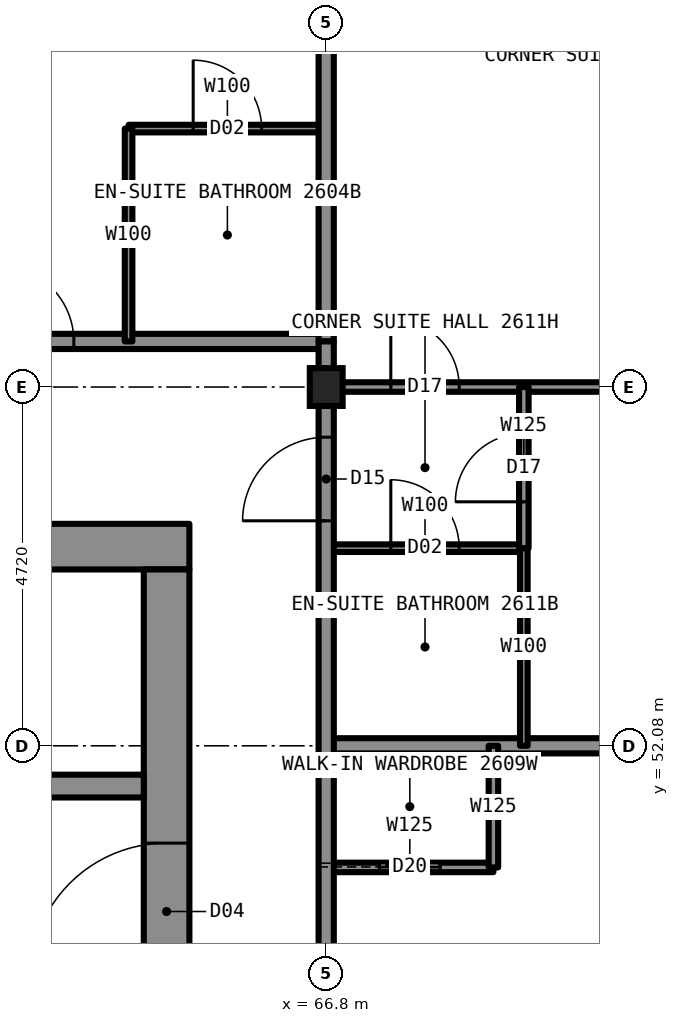
"""IFC4 building model, lengths in metres.
Left out: names, types, materials, properties, quantities, classifications, styles, units other than length and angle.
Written with IfcOpenShell. Run it as: python <this file> out.ifc"""

import sys

from ifc_helpers import new_model, si_unit, direction, frame, frame_2d, origin, origin_2d, place, context, subcontext, project, spatial, rectangle, i_section, extrude, element, fill, save


model = new_model("IFC4")
c1 = context("Model", 3, precision=1e-05, world=origin(), true_north=direction((0.0, 1.0)))
c2 = subcontext(c1, "Body", "Model", "MODEL_VIEW")
j1 = project(units=[si_unit("LENGTHUNIT", "METRE"), si_unit("PLANEANGLEUNIT", "RADIAN")], contexts=[c1])
p1 = place(None, origin())
s1 = spatial("IfcSite", under=j1, at=p1, CompositionType="ELEMENT")
p2 = place(p1, origin())
s2 = spatial("IfcBuilding", under=s1, at=p2, CompositionType="ELEMENT")
p3 = place(p2, frame((0.0, 0.0, 93.4)))
s3 = spatial("IfcBuildingStorey", under=s2, at=p3, CompositionType="ELEMENT", Elevation=93.4)
p4 = place(p3, frame((66.8, 56.8, 0.0), z_axis=(0.0, 0.0, 1.0), x_axis=(1.0, 0.0, 0.0)))
e1 = element("IfcColumn", 1, at=p4, inside=s3, PredefinedType="COLUMN", context=c2, shape_type="SweptSolid", body=[
    extrude(i_section(OverallWidth=0.432, OverallDepth=0.498, WebThickness=0.056, FlangeThickness=0.089, at=origin_2d()), origin(), (0.0, 0.0, 1.0), 3.5),
])
p5 = place(p3, frame((45.0, 54.7, 0.0), z_axis=(0.0, 0.0, 1.0), x_axis=(1.0, 0.0, 0.0)))
e2 = element("IfcWall", 2, at=p5, inside=s3, PredefinedType="SHEAR", context=c2, shape_type="SweptSolid", body=[
    extrude(rectangle(XDim=20.0, YDim=0.6, at=frame_2d((10.0, 0.0))), origin(), (0.0, 0.0, 1.0), 3.5),
])
p6 = place(p3, frame((64.7, 35.6, 0.0), z_axis=(0.0, 0.0, 1.0), x_axis=(0.0, 1.0, 0.0)))
e3 = element("IfcWall", 3, at=p6, inside=s3, PredefinedType="SHEAR", context=c2, shape_type="SweptSolid", body=[
    extrude(rectangle(XDim=18.8, YDim=0.6, at=frame_2d((9.4, 0.0))), origin(), (0.0, 0.0, 1.0), 3.5),
])
p7 = place(p6, frame((13.4, 0.0, 0.0)))
e4 = element("IfcOpeningElement", 4, at=p7, cuts=e3, PredefinedType="OPENING", context=c2, shape_type="SweptSolid", body=[
    extrude(rectangle(XDim=1.8, YDim=2.2, at=frame_2d((0.9, 1.1))), frame((0.0, 0.31, 0.0), z_axis=(0.0, -1.0, 0.0), x_axis=(1.0, 0.0, 0.0)), (0.0, 0.0, 1.0), 0.62),
])
p8 = place(p6, frame((3.6, 0.0, 0.0)))
e5 = element("IfcOpeningElement", 5, at=p8, cuts=e3, PredefinedType="OPENING", context=c2, shape_type="SweptSolid", body=[
    extrude(rectangle(XDim=1.8, YDim=2.2, at=frame_2d((0.9, 1.1))), frame((0.0, 0.31, 0.0), z_axis=(0.0, -1.0, 0.0), x_axis=(1.0, 0.0, 0.0)), (0.0, 0.0, 1.0), 0.62),
])
p9 = place(p3, frame((45.6, 51.55, 0.0), z_axis=(0.0, 0.0, 1.0), x_axis=(1.0, 0.0, 0.0)))
e6 = element("IfcWall", 6, at=p9, inside=s3, PredefinedType="SHEAR", context=c2, shape_type="SweptSolid", body=[
    extrude(rectangle(XDim=18.8, YDim=0.3, at=frame_2d((9.4, 0.0))), origin(), (0.0, 0.0, 1.0), 3.5),
])
p10 = place(p9, frame((0.7, 0.0, 0.0)))
e7 = element("IfcOpeningElement", 7, at=p10, cuts=e6, PredefinedType="OPENING", context=c2, shape_type="SweptSolid", body=[
    extrude(rectangle(XDim=1.1, YDim=2.2, at=frame_2d((0.55, 1.1))), frame((0.0, 0.16, 0.0), z_axis=(0.0, -1.0, 0.0), x_axis=(1.0, 0.0, 0.0)), (0.0, 0.0, 1.0), 0.32),
])
p11 = place(p9, frame((3.4, 0.0, 0.0)))
e8 = element("IfcOpeningElement", 8, at=p11, cuts=e6, PredefinedType="OPENING", context=c2, shape_type="SweptSolid", body=[
    extrude(rectangle(XDim=1.1, YDim=2.2, at=frame_2d((0.55, 1.1))), frame((0.0, 0.16, 0.0), z_axis=(0.0, -1.0, 0.0), x_axis=(1.0, 0.0, 0.0)), (0.0, 0.0, 1.0), 0.32),
])
p12 = place(p9, frame((6.1, 0.0, 0.0)))
e9 = element("IfcOpeningElement", 9, at=p12, cuts=e6, PredefinedType="OPENING", context=c2, shape_type="SweptSolid", body=[
    extrude(rectangle(XDim=1.1, YDim=2.2, at=frame_2d((0.55, 1.1))), frame((0.0, 0.16, 0.0), z_axis=(0.0, -1.0, 0.0), x_axis=(1.0, 0.0, 0.0)), (0.0, 0.0, 1.0), 0.32),
])
p13 = place(p9, frame((8.8, 0.0, 0.0)))
e10 = element("IfcOpeningElement", 10, at=p13, cuts=e6, PredefinedType="OPENING", context=c2, shape_type="SweptSolid", body=[
    extrude(rectangle(XDim=1.1, YDim=2.2, at=frame_2d((0.55, 1.1))), frame((0.0, 0.16, 0.0), z_axis=(0.0, -1.0, 0.0), x_axis=(1.0, 0.0, 0.0)), (0.0, 0.0, 1.0), 0.32),
])
p14 = place(p9, frame((11.6, 0.0, 0.0)))
e11 = element("IfcOpeningElement", 11, at=p14, cuts=e6, PredefinedType="OPENING", context=c2, shape_type="SweptSolid", body=[
    extrude(rectangle(XDim=1.1, YDim=2.2, at=frame_2d((0.55, 1.1))), frame((0.0, 0.16, 0.0), z_axis=(0.0, -1.0, 0.0), x_axis=(1.0, 0.0, 0.0)), (0.0, 0.0, 1.0), 0.32),
])
p15 = place(p9, frame((14.3, 0.0, 0.0)))
e12 = element("IfcOpeningElement", 12, at=p15, cuts=e6, PredefinedType="OPENING", context=c2, shape_type="SweptSolid", body=[
    extrude(rectangle(XDim=1.1, YDim=2.2, at=frame_2d((0.55, 1.1))), frame((0.0, 0.16, 0.0), z_axis=(0.0, -1.0, 0.0), x_axis=(1.0, 0.0, 0.0)), (0.0, 0.0, 1.0), 0.32),
])
p16 = place(p3, frame((66.8, 56.8, 0.0), z_axis=(0.0, 0.0, 1.0), x_axis=(1.0, 0.0, 0.0)))
e13 = element("IfcWall", 13, at=p16, inside=s3, PredefinedType="PARTITIONING", context=c2, shape_type="SweptSolid", body=[
    extrude(rectangle(XDim=8.5, YDim=0.125, at=frame_2d((4.25, 0.0))), origin(), (0.0, 0.0, 1.0), 2.573),
])
p17 = place(p16, frame((0.85, 0.0, 0.0)))
e14 = element("IfcOpeningElement", 14, at=p17, cuts=e13, PredefinedType="OPENING", context=c2, shape_type="SweptSolid", body=[
    extrude(rectangle(XDim=0.9, YDim=2.2, at=frame_2d((0.45, 1.1))), frame((0.0, 0.073, 0.0), z_axis=(0.0, -1.0, 0.0), x_axis=(1.0, 0.0, 0.0)), (0.0, 0.0, 1.0), 0.145),
])
p18 = place(p3, frame((43.2, 57.4, 0.0), z_axis=(0.0, 0.0, 1.0), x_axis=(1.0, 0.0, 0.0)))
e15 = element("IfcWall", 15, at=p18, inside=s3, PredefinedType="PARTITIONING", context=c2, shape_type="SweptSolid", body=[
    extrude(rectangle(XDim=23.6, YDim=0.2, at=frame_2d((11.8, 0.0))), origin(), (0.0, 0.0, 1.0), 3.33),
])
p19 = place(p18, frame((3.0, 0.0, 0.0)))
e16 = element("IfcOpeningElement", 16, at=p19, cuts=e15, PredefinedType="OPENING", context=c2, shape_type="SweptSolid", body=[
    extrude(rectangle(XDim=1.0, YDim=2.2, at=frame_2d((0.5, 1.1))), frame((0.0, 0.11, 0.0), z_axis=(0.0, -1.0, 0.0), x_axis=(1.0, 0.0, 0.0)), (0.0, 0.0, 1.0), 0.22),
])
p20 = place(p18, frame((9.84, 0.0, 0.0)))
e17 = element("IfcOpeningElement", 17, at=p20, cuts=e15, PredefinedType="OPENING", context=c2, shape_type="SweptSolid", body=[
    extrude(rectangle(XDim=1.0, YDim=2.2, at=frame_2d((0.5, 1.1))), frame((0.0, 0.11, 0.0), z_axis=(0.0, -1.0, 0.0), x_axis=(1.0, 0.0, 0.0)), (0.0, 0.0, 1.0), 0.22),
])
p21 = place(p18, frame((16.71, 0.0, 0.0)))
e18 = element("IfcOpeningElement", 18, at=p21, cuts=e15, PredefinedType="OPENING", context=c2, shape_type="SweptSolid", body=[
    extrude(rectangle(XDim=1.0, YDim=2.2, at=frame_2d((0.5, 1.1))), frame((0.0, 0.11, 0.0), z_axis=(0.0, -1.0, 0.0), x_axis=(1.0, 0.0, 0.0)), (0.0, 0.0, 1.0), 0.22),
])
p22 = place(p18, frame((19.28, 0.0, 0.0)))
e19 = element("IfcOpeningElement", 19, at=p22, cuts=e15, PredefinedType="OPENING", context=c2, shape_type="SweptSolid", body=[
    extrude(rectangle(XDim=1.0, YDim=2.2, at=frame_2d((0.5, 1.1))), frame((0.0, 0.11, 0.0), z_axis=(0.0, -1.0, 0.0), x_axis=(1.0, 0.0, 0.0)), (0.0, 0.0, 1.0), 0.22),
])
p23 = place(p3, frame((64.2, 60.2, 0.0), z_axis=(0.0, 0.0, 1.0), x_axis=(1.0, 0.0, 0.0)))
e20 = element("IfcWall", 20, at=p23, inside=s3, PredefinedType="PARTITIONING", context=c2, shape_type="SweptSolid", body=[
    extrude(rectangle(XDim=2.6, YDim=0.1, at=frame_2d((1.3, 0.0))), origin(), (0.0, 0.0, 1.0), 2.731),
])
p24 = place(p23, frame((0.85, 0.0, 0.0)))
e21 = element("IfcOpeningElement", 21, at=p24, cuts=e20, PredefinedType="OPENING", context=c2, shape_type="SweptSolid", body=[
    extrude(rectangle(XDim=0.9, YDim=2.1, at=frame_2d((0.45, 1.05))), frame((0.0, 0.06, 0.0), z_axis=(0.0, -1.0, 0.0), x_axis=(1.0, 0.0, 0.0)), (0.0, 0.0, 1.0), 0.12),
])
p25 = place(p3, frame((66.8, 50.48, 0.0), z_axis=(0.0, 0.0, 1.0), x_axis=(1.0, 0.0, 0.0)))
e22 = element("IfcWall", 22, at=p25, inside=s3, PredefinedType="PARTITIONING", context=c2, shape_type="SweptSolid", body=[
    extrude(rectangle(XDim=2.2, YDim=0.125, at=frame_2d((1.1, 0.0))), origin(), (0.0, 0.0, 1.0), 3.33),
])
p26 = place(p25, frame((0.7, 0.0, 0.0)))
e23 = element("IfcOpeningElement", 23, at=p26, cuts=e22, PredefinedType="OPENING", context=c2, shape_type="SweptSolid", body=[
    extrude(rectangle(XDim=0.8, YDim=2.1, at=frame_2d((0.4, 1.05))), frame((0.0, 0.073, 0.0), z_axis=(0.0, -1.0, 0.0), x_axis=(1.0, 0.0, 0.0)), (0.0, 0.0, 1.0), 0.145),
])
p27 = place(p3, frame((66.8, 52.08, 0.0), z_axis=(0.0, 0.0, 1.0), x_axis=(1.0, 0.0, 0.0)))
e24 = element("IfcWall", 24, at=p27, inside=s3, PredefinedType="PARTITIONING", context=c2, shape_type="SweptSolid", body=[
    extrude(rectangle(XDim=8.5, YDim=0.2, at=frame_2d((4.25, 0.0))), origin(), (0.0, 0.0, 1.0), 2.573),
])
p28 = place(p3, frame((66.8, 54.68, 0.0), z_axis=(0.0, 0.0, 1.0), x_axis=(1.0, 0.0, 0.0)))
e25 = element("IfcWall", 25, at=p28, inside=s3, PredefinedType="PARTITIONING", context=c2, shape_type="SweptSolid", body=[
    extrude(rectangle(XDim=2.6, YDim=0.1, at=frame_2d((1.3, 0.0))), origin(), (0.0, 0.0, 1.0), 3.33),
])
p29 = place(p28, frame((0.85, 0.0, 0.0)))
e26 = element("IfcOpeningElement", 26, at=p29, cuts=e25, PredefinedType="OPENING", context=c2, shape_type="SweptSolid", body=[
    extrude(rectangle(XDim=0.9, YDim=2.1, at=frame_2d((0.45, 1.05))), frame((0.0, 0.06, 0.0), z_axis=(0.0, -1.0, 0.0), x_axis=(1.0, 0.0, 0.0)), (0.0, 0.0, 1.0), 0.12),
])
p30 = place(p3, frame((66.8, 33.22, 0.0), z_axis=(0.0, 0.0, 1.0), x_axis=(0.0, 1.0, 0.0)))
e27 = element("IfcWall", 27, at=p30, inside=s3, PredefinedType="PARTITIONING", context=c2, shape_type="SweptSolid", body=[
    extrude(rectangle(XDim=23.56, YDim=0.2, at=frame_2d((11.78, 0.0))), origin(), (0.0, 0.0, 1.0), 3.33),
])
p31 = place(p30, frame((6.16, 0.0, 0.0)))
e28 = element("IfcOpeningElement", 28, at=p31, cuts=e27, PredefinedType="OPENING", context=c2, shape_type="SweptSolid", body=[
    extrude(rectangle(XDim=1.0, YDim=2.2, at=frame_2d((0.5, 1.1))), frame((0.0, 0.11, 0.0), z_axis=(0.0, -1.0, 0.0), x_axis=(1.0, 0.0, 0.0)), (0.0, 0.0, 1.0), 0.22),
])
p32 = place(p30, frame((12.42, 0.0, 0.0)))
e29 = element("IfcOpeningElement", 29, at=p32, cuts=e27, PredefinedType="OPENING", context=c2, shape_type="SweptSolid", body=[
    extrude(rectangle(XDim=1.0, YDim=2.2, at=frame_2d((0.5, 1.1))), frame((0.0, 0.11, 0.0), z_axis=(0.0, -1.0, 0.0), x_axis=(1.0, 0.0, 0.0)), (0.0, 0.0, 1.0), 0.22),
])
p33 = place(p30, frame((21.82, 0.0, 0.0)))
e30 = element("IfcOpeningElement", 30, at=p33, cuts=e27, PredefinedType="OPENING", context=c2, shape_type="SweptSolid", body=[
    extrude(rectangle(XDim=1.1, YDim=2.2, at=frame_2d((0.55, 1.1))), frame((0.0, 0.11, 0.0), z_axis=(0.0, -1.0, 0.0), x_axis=(1.0, 0.0, 0.0)), (0.0, 0.0, 1.0), 0.22),
])
p34 = place(p30, frame((0.64, 0.0, 0.0)))
e31 = element("IfcOpeningElement", 31, at=p34, cuts=e27, PredefinedType="OPENING", context=c2, shape_type="SweptSolid", body=[
    extrude(rectangle(XDim=1.1, YDim=2.2, at=frame_2d((0.55, 1.1))), frame((0.0, 0.11, 0.0), z_axis=(0.0, -1.0, 0.0), x_axis=(1.0, 0.0, 0.0)), (0.0, 0.0, 1.0), 0.22),
])
p35 = place(p3, frame((66.8, 57.4, 0.0), z_axis=(0.0, 0.0, 1.0), x_axis=(0.0, 1.0, 0.0)))
e32 = element("IfcWall", 32, at=p35, inside=s3, PredefinedType="PARTITIONING", context=c2, shape_type="SweptSolid", body=[
    extrude(rectangle(XDim=7.9, YDim=0.2, at=frame_2d((3.95, 0.0))), origin(), (0.0, 0.0, 1.0), 2.573),
])
p36 = place(p3, frame((69.0, 50.48, 0.0), z_axis=(0.0, 0.0, 1.0), x_axis=(0.0, 1.0, 0.0)))
e33 = element("IfcWall", 33, at=p36, inside=s3, PredefinedType="PARTITIONING", context=c2, shape_type="SweptSolid", body=[
    extrude(rectangle(XDim=1.6, YDim=0.125, at=frame_2d((0.8, 0.0))), origin(), (0.0, 0.0, 1.0), 3.33),
])
p37 = place(p3, frame((69.4, 52.08, 0.0), z_axis=(0.0, 0.0, 1.0), x_axis=(0.0, 1.0, 0.0)))
e34 = element("IfcWall", 34, at=p37, inside=s3, PredefinedType="PARTITIONING", context=c2, shape_type="SweptSolid", body=[
    extrude(rectangle(XDim=2.6, YDim=0.1, at=frame_2d((1.3, 0.0))), origin(), (0.0, 0.0, 1.0), 3.33),
])
p38 = place(p3, frame((69.4, 54.68, 0.0), z_axis=(0.0, 0.0, 1.0), x_axis=(0.0, 1.0, 0.0)))
e35 = element("IfcWall", 35, at=p38, inside=s3, PredefinedType="PARTITIONING", context=c2, shape_type="SweptSolid", body=[
    extrude(rectangle(XDim=2.12, YDim=0.125, at=frame_2d((1.06, 0.0))), origin(), (0.0, 0.0, 1.0), 3.33),
])
p39 = place(p38, frame((0.61, 0.0, 0.0)))
e36 = element("IfcOpeningElement", 36, at=p39, cuts=e35, PredefinedType="OPENING", context=c2, shape_type="SweptSolid", body=[
    extrude(rectangle(XDim=0.9, YDim=2.2, at=frame_2d((0.45, 1.1))), frame((0.0, 0.073, 0.0), z_axis=(0.0, -1.0, 0.0), x_axis=(1.0, 0.0, 0.0)), (0.0, 0.0, 1.0), 0.145),
])
p40 = place(p3, frame((64.2, 57.4, 0.0), z_axis=(0.0, 0.0, 1.0), x_axis=(0.0, 1.0, 0.0)))
e37 = element("IfcWall", 37, at=p40, inside=s3, PredefinedType="PARTITIONING", context=c2, shape_type="SweptSolid", body=[
    extrude(rectangle(XDim=2.8, YDim=0.1, at=frame_2d((1.4, 0.0))), origin(), (0.0, 0.0, 1.0), 3.33),
])
p41 = place(p3, frame((66.8, 56.78, 0.0), z_axis=(0.0, 0.0, 1.0), x_axis=(0.0, 1.0, 0.0)))
e38 = element("IfcWall", 38, at=p41, inside=s3, PredefinedType="PARTITIONING", context=c2, shape_type="SweptSolid", body=[
    extrude(rectangle(XDim=0.62, YDim=0.2, at=frame_2d((0.31, 0.0))), origin(), (0.0, 0.0, 1.0), 2.573),
])
p42 = place(p22, origin())
e39 = element("IfcDoor", 39, at=p42, inside=s3, OperationType="SINGLE_SWING_LEFT", PredefinedType="DOOR", context=c2, shape_type="SweptSolid", body=[
    extrude(rectangle(XDim=1.0, YDim=2.2, at=frame_2d((0.5, 1.1))), frame((0.0, 0.025, 0.0), z_axis=(0.0, -1.0, 0.0), x_axis=(1.0, 0.0, 0.0)), (0.0, 0.0, 1.0), 0.05),
])
fill(e19, e39)
p43 = place(p24, origin())
e40 = element("IfcDoor", 40, at=p43, inside=s3, OperationType="SINGLE_SWING_RIGHT", PredefinedType="DOOR", context=c2, shape_type="SweptSolid", body=[
    extrude(rectangle(XDim=0.9, YDim=2.1, at=frame_2d((0.45, 1.05))), frame((0.0, 0.025, 0.0), z_axis=(0.0, -1.0, 0.0), x_axis=(1.0, 0.0, 0.0)), (0.0, 0.0, 1.0), 0.05),
])
fill(e21, e40)
p44 = place(p26, origin())
e41 = element("IfcDoor", 41, at=p44, inside=s3, OperationType="SLIDING_TO_LEFT", PredefinedType="DOOR", context=c2, shape_type="SweptSolid", body=[
    extrude(rectangle(XDim=0.8, YDim=2.1, at=frame_2d((0.4, 1.05))), frame((0.0, 0.025, 0.0), z_axis=(0.0, -1.0, 0.0), x_axis=(1.0, 0.0, 0.0)), (0.0, 0.0, 1.0), 0.05),
])
fill(e23, e41)
p45 = place(p17, origin())
e42 = element("IfcDoor", 42, at=p45, inside=s3, OperationType="SINGLE_SWING_LEFT", PredefinedType="DOOR", context=c2, shape_type="SweptSolid", body=[
    extrude(rectangle(XDim=0.9, YDim=2.2, at=frame_2d((0.45, 1.1))), frame((0.0, 0.025, 0.0), z_axis=(0.0, -1.0, 0.0), x_axis=(1.0, 0.0, 0.0)), (0.0, 0.0, 1.0), 0.05),
])
fill(e14, e42)
p46 = place(p29, origin())
e43 = element("IfcDoor", 43, at=p46, inside=s3, OperationType="SINGLE_SWING_RIGHT", PredefinedType="DOOR", context=c2, shape_type="SweptSolid", body=[
    extrude(rectangle(XDim=0.9, YDim=2.1, at=frame_2d((0.45, 1.05))), frame((0.0, 0.025, 0.0), z_axis=(0.0, -1.0, 0.0), x_axis=(1.0, 0.0, 0.0)), (0.0, 0.0, 1.0), 0.05),
])
fill(e26, e43)
p47 = place(p33, origin())
e44 = element("IfcDoor", 44, at=p47, inside=s3, OperationType="SINGLE_SWING_LEFT", PredefinedType="DOOR", context=c2, shape_type="SweptSolid", body=[
    extrude(rectangle(XDim=1.1, YDim=2.2, at=frame_2d((0.55, 1.1))), frame((0.0, 0.025, 0.0), z_axis=(0.0, -1.0, 0.0), x_axis=(1.0, 0.0, 0.0)), (0.0, 0.0, 1.0), 0.05),
])
fill(e30, e44)
p48 = place(p39, origin())
e45 = element("IfcDoor", 45, at=p48, inside=s3, OperationType="SINGLE_SWING_LEFT", PredefinedType="DOOR", context=c2, shape_type="SweptSolid", body=[
    extrude(rectangle(XDim=0.9, YDim=2.2, at=frame_2d((0.45, 1.1))), frame((0.0, 0.025, 0.0), z_axis=(0.0, -1.0, 0.0), x_axis=(1.0, 0.0, 0.0)), (0.0, 0.0, 1.0), 0.05),
])
fill(e36, e45)
p49 = place(p7, origin())
e46 = element("IfcDoor", 46, at=p49, inside=s3, OperationType="DOUBLE_DOOR_SINGLE_SWING", PredefinedType="DOOR", context=c2, shape_type="SweptSolid", body=[
    extrude(rectangle(XDim=1.8, YDim=2.2, at=frame_2d((0.9, 1.1))), frame((0.0, 0.025, 0.0), z_axis=(0.0, -1.0, 0.0), x_axis=(1.0, 0.0, 0.0)), (0.0, 0.0, 1.0), 0.05),
])
fill(e4, e46)
save(model, sys.argv[1])
